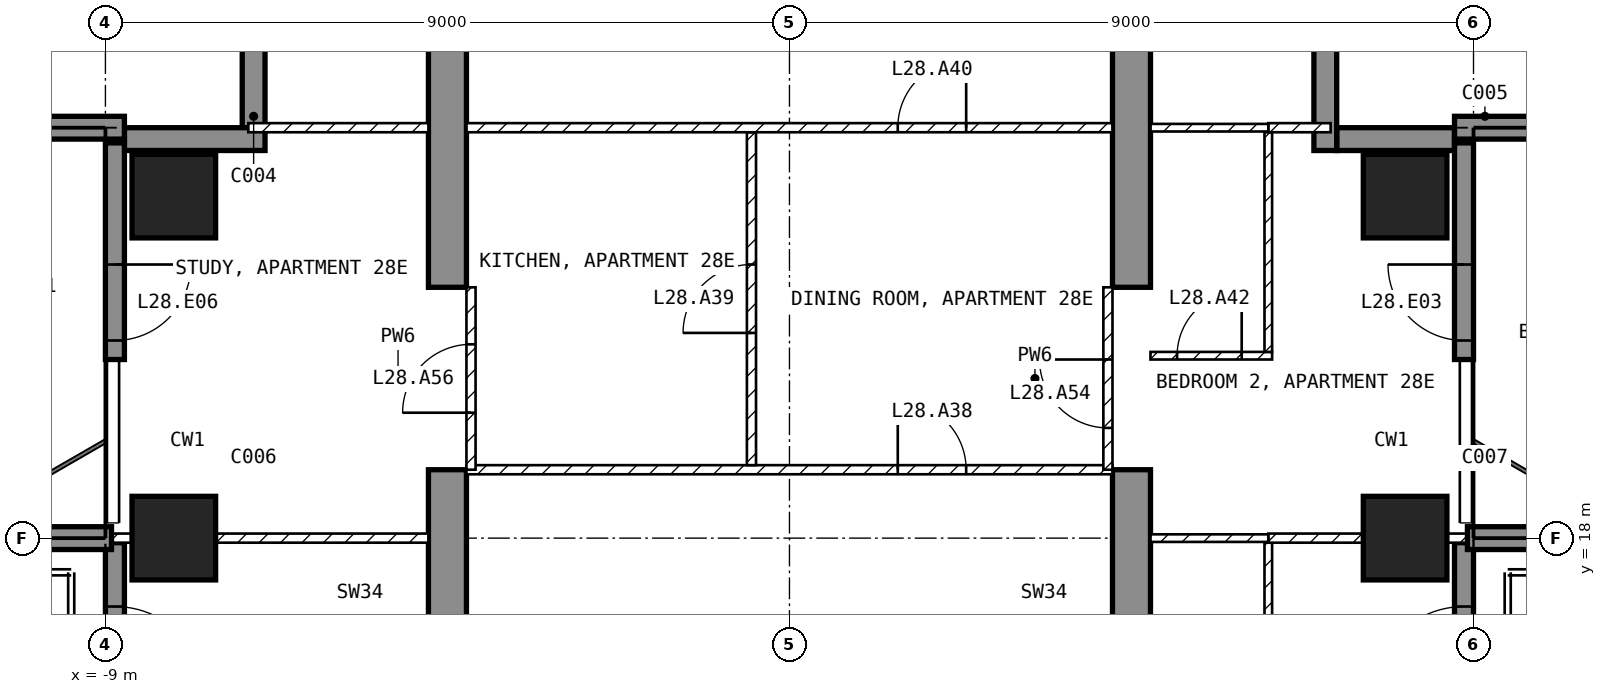
"""IFC4 building model, lengths in metres.
Left out: names, types, materials, properties, quantities, classifications, styles, units other than length and angle.
Written with IfcOpenShell. Run it as: python <this file> out.ifc"""

import sys

from ifc_helpers import new_model, si_unit, direction, frame, frame_2d, origin, origin_2d, place, context, subcontext, project, spatial, polyline, rectangle, outline, extrude, element, fill, save


model = new_model("IFC4")
c1 = context("Model", 3, precision=1e-05, world=origin(), true_north=direction((0.0, 1.0)))
c2 = subcontext(c1, "Body", "Model", "MODEL_VIEW")
j1 = project(units=[si_unit("LENGTHUNIT", "METRE"), si_unit("PLANEANGLEUNIT", "RADIAN")], contexts=[c1])
p1 = place(None, origin())
s1 = spatial("IfcSite", under=j1, at=p1, CompositionType="ELEMENT")
p2 = place(p1, origin())
s2 = spatial("IfcBuilding", under=s1, at=p2, CompositionType="ELEMENT")
p3 = place(p2, frame((0.0, 0.0, 119.9)))
s3 = spatial("IfcBuildingStorey", under=s2, at=p3, CompositionType="ELEMENT", Elevation=119.9)
for number, where, z_axis, x_axis in (
    (1, (-8.1, 18.0, -0.25), (0.0, 0.0, 1.0), (1.0, 0.0, 0.0)),
    (2, (-8.1, 22.5, -0.25), (0.0, 0.0, 1.0), (1.0, 0.0, 0.0)),
    (3, (8.1, 18.0, -0.25), (0.0, 0.0, 1.0), (1.0, 0.0, 0.0)),
    (4, (8.1, 22.5, -0.25), (0.0, 0.0, 1.0), (1.0, 0.0, 0.0)),
):
    element("IfcColumn", number, at=place(p3, frame(where, z_axis=z_axis, x_axis=x_axis)), inside=s3, PredefinedType="COLUMN", context=c2, shape_type="SweptSolid", body=[
        extrude(rectangle(XDim=1.1, YDim=1.1, at=origin_2d()), origin(), (0.0, 0.0, 1.0), 3.5),
    ])
for number, where, z_axis, x_axis in (
    (5, (-4.75, 9.0, -0.25), (1.0, 0.0, 0.0), (0.0, 1.0, 0.0)),
    (6, (4.25, 9.0, -0.25), (1.0, 0.0, 0.0), (0.0, 1.0, 0.0)),
):
    element("IfcWall", number, at=place(p3, frame(where, z_axis=z_axis, x_axis=x_axis)), inside=s3, PredefinedType="SHEAR", context=c2, shape_type="SweptSolid", body=[
        extrude(outline(polyline([(0.0, 0.0), (2.1, 0.0), (2.1, 2.65), (4.5, 2.65), (4.5, 0.0), (9.9, 0.0), (9.9, 2.65), (12.3, 2.65), (12.3, 0.0), (16.55, 0.0), (16.55, 3.5), (0.0, 3.5), (0.0, 0.0)])), origin(), (0.0, 0.0, 1.0), 0.5),
    ])
p4 = place(p3, frame((8.875, 15.65, 0.0), z_axis=(0.0, 0.0, 1.0), x_axis=(0.0, 1.0, 0.0)))
e7 = element("IfcWall", 7, at=p4, inside=s3, PredefinedType="SOLIDWALL", context=c2, shape_type="SweptSolid", body=[
    extrude(rectangle(XDim=2.29, YDim=0.25, at=frame_2d((1.145, 0.0))), origin(), (0.0, 0.0, 1.0), 3.25),
])
p5 = place(p4, frame((0.25, 0.0, 0.0)))
e8 = element("IfcOpeningElement", 8, at=p5, cuts=e7, PredefinedType="OPENING", context=c2, shape_type="SweptSolid", body=[
    extrude(rectangle(XDim=1.2, YDim=2.4, at=frame_2d((0.6, 1.2))), frame((0.0, 0.135, 0.0), z_axis=(0.0, -1.0, 0.0), x_axis=(1.0, 0.0, 0.0)), (0.0, 0.0, 1.0), 0.27),
])
p6 = place(p3, frame((8.875, 20.35, 0.0), z_axis=(0.0, 0.0, 1.0), x_axis=(0.0, 1.0, 0.0)))
e9 = element("IfcWall", 9, at=p6, inside=s3, PredefinedType="SOLIDWALL", context=c2, shape_type="SweptSolid", body=[
    extrude(rectangle(XDim=2.85, YDim=0.25, at=frame_2d((1.425, 0.0))), origin(), (0.0, 0.0, 1.0), 3.25),
])
p7 = place(p6, frame((0.25, 0.0, 0.0)))
e10 = element("IfcOpeningElement", 10, at=p7, cuts=e9, PredefinedType="OPENING", context=c2, shape_type="SweptSolid", body=[
    extrude(rectangle(XDim=1.0, YDim=2.4, at=frame_2d((0.5, 1.2))), frame((0.0, 0.135, 0.0), z_axis=(0.0, -1.0, 0.0), x_axis=(1.0, 0.0, 0.0)), (0.0, 0.0, 1.0), 0.27),
])
p8 = place(p3, frame((-8.875, 23.2, 0.0), z_axis=(0.0, 0.0, 1.0), x_axis=(0.0, -1.0, 0.0)))
e11 = element("IfcWall", 11, at=p8, inside=s3, PredefinedType="SOLIDWALL", context=c2, shape_type="SweptSolid", body=[
    extrude(rectangle(XDim=2.85, YDim=0.25, at=frame_2d((1.425, 0.0))), origin(), (0.0, 0.0, 1.0), 3.25),
])
p9 = place(p8, frame((1.6, 0.0, 0.0)))
e12 = element("IfcOpeningElement", 12, at=p9, cuts=e11, PredefinedType="OPENING", context=c2, shape_type="SweptSolid", body=[
    extrude(rectangle(XDim=1.0, YDim=2.4, at=frame_2d((0.5, 1.2))), frame((0.0, 0.135, 0.0), z_axis=(0.0, -1.0, 0.0), x_axis=(1.0, 0.0, 0.0)), (0.0, 0.0, 1.0), 0.27),
])
p10 = place(p3, frame((-8.875, 17.94, 0.0), z_axis=(0.0, 0.0, 1.0), x_axis=(0.0, -1.0, 0.0)))
e13 = element("IfcWall", 13, at=p10, inside=s3, PredefinedType="SOLIDWALL", context=c2, shape_type="SweptSolid", body=[
    extrude(rectangle(XDim=2.29, YDim=0.25, at=frame_2d((1.145, 0.0))), origin(), (0.0, 0.0, 1.0), 3.25),
])
p11 = place(p10, frame((0.84, 0.0, 0.0)))
e14 = element("IfcOpeningElement", 14, at=p11, cuts=e13, PredefinedType="OPENING", context=c2, shape_type="SweptSolid", body=[
    extrude(rectangle(XDim=1.2, YDim=2.4, at=frame_2d((0.6, 1.2))), frame((0.0, 0.135, 0.0), z_axis=(0.0, -1.0, 0.0), x_axis=(1.0, 0.0, 0.0)), (0.0, 0.0, 1.0), 0.27),
])
p12 = place(p3, frame((8.75, 23.25, 0.0), z_axis=(0.0, 0.0, 1.0), x_axis=(-1.0, 0.0, 0.0)))
e15 = element("IfcWall", 15, at=p12, inside=s3, PredefinedType="SOLIDWALL", context=c2, shape_type="SweptSolid", body=[
    extrude(rectangle(XDim=1.55, YDim=0.3, at=frame_2d((0.775, 0.0))), origin(), (0.0, 0.0, 1.0), 3.25),
])
p13 = place(p3, frame((7.05, 23.1, 0.0), z_axis=(0.0, 0.0, 1.0), x_axis=(0.0, 1.0, 0.0)))
e16 = element("IfcWall", 16, at=p13, inside=s3, PredefinedType="SOLIDWALL", context=c2, shape_type="SweptSolid", body=[
    extrude(rectangle(XDim=1.8, YDim=0.3, at=frame_2d((0.9, 0.0))), origin(), (0.0, 0.0, 1.0), 3.25),
])
p14 = place(p3, frame((-7.05, 25.2, 0.0), z_axis=(0.0, 0.0, 1.0), x_axis=(0.0, -1.0, 0.0)))
e17 = element("IfcWall", 17, at=p14, inside=s3, PredefinedType="SOLIDWALL", context=c2, shape_type="SweptSolid", body=[
    extrude(rectangle(XDim=1.8, YDim=0.3, at=frame_2d((0.9, 0.0))), origin(), (0.0, 0.0, 1.0), 3.25),
])
p15 = place(p3, frame((-6.9, 23.25, 0.0), z_axis=(0.0, 0.0, 1.0), x_axis=(-1.0, 0.0, 0.0)))
e18 = element("IfcWall", 18, at=p15, inside=s3, PredefinedType="SOLIDWALL", context=c2, shape_type="SweptSolid", body=[
    extrude(rectangle(XDim=1.85, YDim=0.3, at=frame_2d((0.925, 0.0))), origin(), (0.0, 0.0, 1.0), 3.25),
])
p16 = place(p3, frame((-8.92, 18.0, 0.0), z_axis=(0.0, 0.0, 1.0), x_axis=(-1.0, 0.0, 0.0)))
e19 = element("IfcWall", 19, at=p16, inside=s3, PredefinedType="SOLIDWALL", context=c2, shape_type="SweptSolid", body=[
    extrude(rectangle(XDim=2.82, YDim=0.3, at=frame_2d((1.41, 0.0))), origin(), (0.0, 0.0, 1.0), 3.25),
])
p17 = place(p3, frame((-8.75, 23.4, 0.0), z_axis=(0.0, 0.0, 1.0), x_axis=(-1.0, 0.0, 0.0)))
e20 = element("IfcWall", 20, at=p17, inside=s3, PredefinedType="SOLIDWALL", context=c2, shape_type="SweptSolid", body=[
    extrude(rectangle(XDim=2.95, YDim=0.3, at=frame_2d((1.475, 0.0))), origin(), (0.0, 0.0, 1.0), 3.25),
])
p18 = place(p3, frame((8.92, 18.0, 0.0), z_axis=(0.0, 0.0, 1.0), x_axis=(1.0, 0.0, 0.0)))
e21 = element("IfcWall", 21, at=p18, inside=s3, PredefinedType="SOLIDWALL", context=c2, shape_type="SweptSolid", body=[
    extrude(rectangle(XDim=2.82, YDim=0.3, at=frame_2d((1.41, 0.0))), origin(), (0.0, 0.0, 1.0), 3.25),
])
p19 = place(p3, frame((8.75, 23.4, 0.0), z_axis=(0.0, 0.0, 1.0), x_axis=(1.0, 0.0, 0.0)))
e22 = element("IfcWall", 22, at=p19, inside=s3, PredefinedType="SOLIDWALL", context=c2, shape_type="SweptSolid", body=[
    extrude(rectangle(XDim=2.95, YDim=0.3, at=frame_2d((1.475, 0.0))), origin(), (0.0, 0.0, 1.0), 3.25),
])
p20 = place(p3, frame((-4.25, 18.9, 0.0), z_axis=(0.0, 0.0, 1.0), x_axis=(1.0, 0.0, 0.0)))
e23 = element("IfcWall", 23, at=p20, inside=s3, PredefinedType="PARTITIONING", context=c2, shape_type="SweptSolid", body=[
    extrude(rectangle(XDim=8.5, YDim=0.12, at=frame_2d((4.25, 0.0))), origin(), (0.0, 0.0, 1.0), 3.25),
])
p21 = place(p20, frame((5.675, 0.0, 0.0)))
e24 = element("IfcOpeningElement", 24, at=p21, cuts=e23, PredefinedType="OPENING", context=c2, shape_type="SweptSolid", body=[
    extrude(rectangle(XDim=0.9, YDim=2.1, at=frame_2d((0.45, 1.05))), frame((0.0, 0.07, 0.0), z_axis=(0.0, -1.0, 0.0), x_axis=(1.0, 0.0, 0.0)), (0.0, 0.0, 1.0), 0.14),
])
p22 = place(p3, frame((-0.5, 18.96, 0.0), z_axis=(0.0, 0.0, 1.0), x_axis=(0.0, 1.0, 0.0)))
e25 = element("IfcWall", 25, at=p22, inside=s3, PredefinedType="PARTITIONING", context=c2, shape_type="SweptSolid", body=[
    extrude(rectangle(XDim=4.38, YDim=0.12, at=frame_2d((2.19, 0.0))), origin(), (0.0, 0.0, 1.0), 3.25),
])
p23 = place(p22, frame((1.74, 0.0, 0.0)))
e26 = element("IfcOpeningElement", 26, at=p23, cuts=e25, PredefinedType="OPENING", context=c2, shape_type="SweptSolid", body=[
    extrude(rectangle(XDim=0.9, YDim=2.1, at=frame_2d((0.45, 1.05))), frame((0.0, 0.07, 0.0), z_axis=(0.0, -1.0, 0.0), x_axis=(1.0, 0.0, 0.0)), (0.0, 0.0, 1.0), 0.14),
])
p24 = place(p3, frame((-4.25, 23.4, 0.0), z_axis=(0.0, 0.0, 1.0), x_axis=(1.0, 0.0, 0.0)))
e27 = element("IfcWall", 27, at=p24, inside=s3, PredefinedType="PARTITIONING", context=c2, shape_type="SweptSolid", body=[
    extrude(rectangle(XDim=8.5, YDim=0.12, at=frame_2d((4.25, 0.0))), origin(), (0.0, 0.0, 1.0), 3.25),
])
p25 = place(p24, frame((5.675, 0.0, 0.0)))
e28 = element("IfcOpeningElement", 28, at=p25, cuts=e27, PredefinedType="OPENING", context=c2, shape_type="SweptSolid", body=[
    extrude(rectangle(XDim=0.9, YDim=2.1, at=frame_2d((0.45, 1.05))), frame((0.0, 0.07, 0.0), z_axis=(0.0, -1.0, 0.0), x_axis=(1.0, 0.0, 0.0)), (0.0, 0.0, 1.0), 0.14),
])
p26 = place(p3, frame((6.3, 14.45, 0.0), z_axis=(0.0, 0.0, 1.0), x_axis=(0.0, 1.0, 0.0)))
e29 = element("IfcWall", 29, at=p26, inside=s3, PredefinedType="PARTITIONING", context=c2, shape_type="SweptSolid", body=[
    extrude(rectangle(XDim=3.49, YDim=0.1, at=frame_2d((1.745, 0.0))), origin(), (0.0, 0.0, 1.0), 3.25),
])
p27 = place(p3, frame((6.3, 18.0, 0.0), z_axis=(0.0, 0.0, 1.0), x_axis=(1.0, 0.0, 0.0)))
e30 = element("IfcWall", 30, at=p27, inside=s3, PredefinedType="PARTITIONING", context=c2, shape_type="SweptSolid", body=[
    extrude(rectangle(XDim=2.62, YDim=0.12, at=frame_2d((1.31, 0.0))), origin(), (0.0, 0.0, 1.0), 2.414),
])
p28 = place(p3, frame((4.75, 18.0, 0.0), z_axis=(0.0, 0.0, 1.0), x_axis=(1.0, 0.0, 0.0)))
e31 = element("IfcWall", 31, at=p28, inside=s3, PredefinedType="PARTITIONING", context=c2, shape_type="SweptSolid", body=[
    extrude(rectangle(XDim=1.55, YDim=0.1, at=frame_2d((0.775, 0.0))), origin(), (0.0, 0.0, 1.0), 2.414),
])
p29 = place(p3, frame((4.75, 20.4, 0.0), z_axis=(0.0, 0.0, 1.0), x_axis=(1.0, 0.0, 0.0)))
e32 = element("IfcWall", 32, at=p29, inside=s3, PredefinedType="PARTITIONING", context=c2, shape_type="SweptSolid", body=[
    extrude(rectangle(XDim=1.6, YDim=0.1, at=frame_2d((0.8, 0.0))), origin(), (0.0, 0.0, 1.0), 3.25),
])
p30 = place(p29, frame((0.35, 0.0, 0.0)))
e33 = element("IfcOpeningElement", 33, at=p30, cuts=e32, PredefinedType="OPENING", context=c2, shape_type="SweptSolid", body=[
    extrude(rectangle(XDim=0.85, YDim=2.1, at=frame_2d((0.425, 1.05))), frame((0.0, 0.06, 0.0), z_axis=(0.0, -1.0, 0.0), x_axis=(1.0, 0.0, 0.0)), (0.0, 0.0, 1.0), 0.12),
])
p31 = place(p3, frame((6.3, 20.45, 0.0), z_axis=(0.0, 0.0, 1.0), x_axis=(0.0, 1.0, 0.0)))
e34 = element("IfcWall", 34, at=p31, inside=s3, PredefinedType="PARTITIONING", context=c2, shape_type="SweptSolid", body=[
    extrude(rectangle(XDim=2.89, YDim=0.1, at=frame_2d((1.445, 0.0))), origin(), (0.0, 0.0, 1.0), 3.25),
])
p32 = place(p3, frame((6.3, 23.4, 0.0), z_axis=(0.0, 0.0, 1.0), x_axis=(1.0, 0.0, 0.0)))
e35 = element("IfcWall", 35, at=p32, inside=s3, PredefinedType="PARTITIONING", context=c2, shape_type="SweptSolid", body=[
    extrude(rectangle(XDim=0.82, YDim=0.12, at=frame_2d((0.41, 0.0))), origin(), (0.0, 0.0, 1.0), 3.25),
])
p33 = place(p3, frame((4.75, 23.4, 0.0), z_axis=(0.0, 0.0, 1.0), x_axis=(1.0, 0.0, 0.0)))
e36 = element("IfcWall", 36, at=p33, inside=s3, PredefinedType="PARTITIONING", context=c2, shape_type="SweptSolid", body=[
    extrude(rectangle(XDim=1.55, YDim=0.1, at=frame_2d((0.775, 0.0))), origin(), (0.0, 0.0, 1.0), 3.25),
])
p34 = place(p3, frame((-8.92, 18.0, 0.0), z_axis=(0.0, 0.0, 1.0), x_axis=(1.0, 0.0, 0.0)))
e37 = element("IfcWall", 37, at=p34, inside=s3, PredefinedType="PARTITIONING", context=c2, shape_type="SweptSolid", body=[
    extrude(rectangle(XDim=4.17, YDim=0.12, at=frame_2d((2.085, 0.0))), origin(), (0.0, 0.0, 1.0), 2.414),
])
p35 = place(p3, frame((-7.12, 23.4, 0.0), z_axis=(0.0, 0.0, 1.0), x_axis=(1.0, 0.0, 0.0)))
e38 = element("IfcWall", 38, at=p35, inside=s3, PredefinedType="PARTITIONING", context=c2, shape_type="SweptSolid", body=[
    extrude(rectangle(XDim=2.37, YDim=0.12, at=frame_2d((1.185, 0.0))), origin(), (0.0, 0.0, 1.0), 3.25),
])
p36 = place(p3, frame((4.19, 18.9, 0.0), z_axis=(0.0, 0.0, 1.0), x_axis=(0.0, 1.0, 0.0)))
e39 = element("IfcWall", 39, at=p36, inside=s3, PredefinedType="PARTITIONING", context=c2, shape_type="SweptSolid", body=[
    extrude(rectangle(XDim=2.4, YDim=0.12, at=frame_2d((1.2, 0.0))), origin(), (0.0, 0.0, 1.0), 2.4),
])
p37 = place(p36, frame((0.55, 0.0, 0.0)))
e40 = element("IfcOpeningElement", 40, at=p37, cuts=e39, PredefinedType="OPENING", context=c2, shape_type="SweptSolid", body=[
    extrude(rectangle(XDim=0.9, YDim=2.1, at=frame_2d((0.45, 1.05))), frame((0.0, 0.07, 0.0), z_axis=(0.0, -1.0, 0.0), x_axis=(1.0, 0.0, 0.0)), (0.0, 0.0, 1.0), 0.14),
])
p38 = place(p3, frame((-4.19, 18.9, 0.0), z_axis=(0.0, 0.0, 1.0), x_axis=(0.0, 1.0, 0.0)))
e41 = element("IfcWall", 41, at=p38, inside=s3, PredefinedType="PARTITIONING", context=c2, shape_type="SweptSolid", body=[
    extrude(rectangle(XDim=2.4, YDim=0.12, at=frame_2d((1.2, 0.0))), origin(), (0.0, 0.0, 1.0), 2.4),
])
p39 = place(p38, frame((0.75, 0.0, 0.0)))
e42 = element("IfcOpeningElement", 42, at=p39, cuts=e41, PredefinedType="OPENING", context=c2, shape_type="SweptSolid", body=[
    extrude(rectangle(XDim=0.9, YDim=2.1, at=frame_2d((0.45, 1.05))), frame((0.0, 0.07, 0.0), z_axis=(0.0, -1.0, 0.0), x_axis=(1.0, 0.0, 0.0)), (0.0, 0.0, 1.0), 0.14),
])
p40 = place(p5, origin())
e43 = element("IfcDoor", 43, at=p40, inside=s3, OperationType="SINGLE_SWING_LEFT", PredefinedType="DOOR", context=c2, shape_type="SweptSolid", body=[
    extrude(rectangle(XDim=1.2, YDim=2.4, at=frame_2d((0.6, 1.2))), frame((0.0, 0.025, 0.0), z_axis=(0.0, -1.0, 0.0), x_axis=(1.0, 0.0, 0.0)), (0.0, 0.0, 1.0), 0.05),
])
fill(e8, e43)
p41 = place(p7, origin())
e44 = element("IfcDoor", 44, at=p41, inside=s3, OperationType="SINGLE_SWING_RIGHT", PredefinedType="DOOR", context=c2, shape_type="SweptSolid", body=[
    extrude(rectangle(XDim=1.0, YDim=2.4, at=frame_2d((0.5, 1.2))), frame((0.0, 0.025, 0.0), z_axis=(0.0, -1.0, 0.0), x_axis=(1.0, 0.0, 0.0)), (0.0, 0.0, 1.0), 0.05),
])
fill(e10, e44)
p42 = place(p9, origin())
e45 = element("IfcDoor", 45, at=p42, inside=s3, OperationType="SINGLE_SWING_LEFT", PredefinedType="DOOR", context=c2, shape_type="SweptSolid", body=[
    extrude(rectangle(XDim=1.0, YDim=2.4, at=frame_2d((0.5, 1.2))), frame((0.0, 0.025, 0.0), z_axis=(0.0, -1.0, 0.0), x_axis=(1.0, 0.0, 0.0)), (0.0, 0.0, 1.0), 0.05),
])
fill(e12, e45)
p43 = place(p11, origin())
e46 = element("IfcDoor", 46, at=p43, inside=s3, OperationType="SINGLE_SWING_RIGHT", PredefinedType="DOOR", context=c2, shape_type="SweptSolid", body=[
    extrude(rectangle(XDim=1.2, YDim=2.4, at=frame_2d((0.6, 1.2))), frame((0.0, 0.025, 0.0), z_axis=(0.0, -1.0, 0.0), x_axis=(1.0, 0.0, 0.0)), (0.0, 0.0, 1.0), 0.05),
])
fill(e14, e46)
p44 = place(p21, origin())
e47 = element("IfcDoor", 47, at=p44, inside=s3, OperationType="SINGLE_SWING_LEFT", PredefinedType="DOOR", context=c2, shape_type="SweptSolid", body=[
    extrude(rectangle(XDim=0.9, YDim=2.1, at=frame_2d((0.45, 1.05))), frame((0.0, 0.025, 0.0), z_axis=(0.0, -1.0, 0.0), x_axis=(1.0, 0.0, 0.0)), (0.0, 0.0, 1.0), 0.05),
])
fill(e24, e47)
p45 = place(p23, origin())
e48 = element("IfcDoor", 48, at=p45, inside=s3, OperationType="SINGLE_SWING_LEFT", PredefinedType="DOOR", context=c2, shape_type="SweptSolid", body=[
    extrude(rectangle(XDim=0.9, YDim=2.1, at=frame_2d((0.45, 1.05))), frame((0.0, 0.025, 0.0), z_axis=(0.0, -1.0, 0.0), x_axis=(1.0, 0.0, 0.0)), (0.0, 0.0, 1.0), 0.05),
])
fill(e26, e48)
p46 = place(p25, origin())
e49 = element("IfcDoor", 49, at=p46, inside=s3, OperationType="SINGLE_SWING_RIGHT", PredefinedType="DOOR", context=c2, shape_type="SweptSolid", body=[
    extrude(rectangle(XDim=0.9, YDim=2.1, at=frame_2d((0.45, 1.05))), frame((0.0, 0.025, 0.0), z_axis=(0.0, -1.0, 0.0), x_axis=(1.0, 0.0, 0.0)), (0.0, 0.0, 1.0), 0.05),
])
fill(e28, e49)
p47 = place(p30, origin())
e50 = element("IfcDoor", 50, at=p47, inside=s3, OperationType="SINGLE_SWING_RIGHT", PredefinedType="DOOR", context=c2, shape_type="SweptSolid", body=[
    extrude(rectangle(XDim=0.85, YDim=2.1, at=frame_2d((0.425, 1.05))), frame((0.0, 0.025, 0.0), z_axis=(0.0, -1.0, 0.0), x_axis=(1.0, 0.0, 0.0)), (0.0, 0.0, 1.0), 0.05),
])
fill(e33, e50)
p48 = place(p37, origin())
e51 = element("IfcDoor", 51, at=p48, inside=s3, OperationType="SINGLE_SWING_RIGHT", PredefinedType="DOOR", context=c2, shape_type="SweptSolid", body=[
    extrude(rectangle(XDim=0.9, YDim=2.1, at=frame_2d((0.45, 1.05))), frame((0.0, 0.025, 0.0), z_axis=(0.0, -1.0, 0.0), x_axis=(1.0, 0.0, 0.0)), (0.0, 0.0, 1.0), 0.05),
])
fill(e40, e51)
p49 = place(p39, origin())
e52 = element("IfcDoor", 52, at=p49, inside=s3, OperationType="SINGLE_SWING_LEFT", PredefinedType="DOOR", context=c2, shape_type="SweptSolid", body=[
    extrude(rectangle(XDim=0.9, YDim=2.1, at=frame_2d((0.45, 1.05))), frame((0.0, 0.025, 0.0), z_axis=(0.0, -1.0, 0.0), x_axis=(1.0, 0.0, 0.0)), (0.0, 0.0, 1.0), 0.05),
])
fill(e42, e52)
save(model, sys.argv[1])
